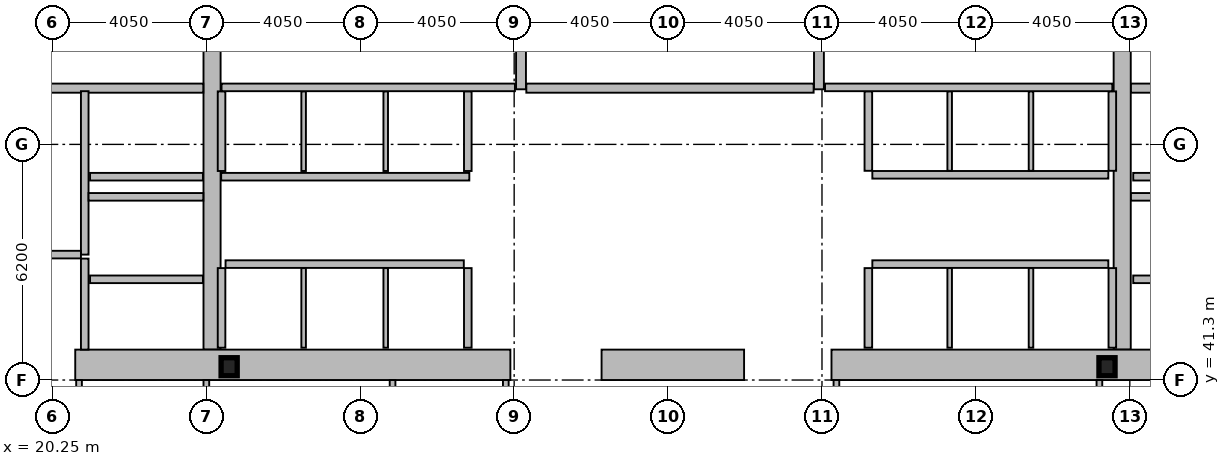
"""IFC4 building model, lengths in metres.
Left out: names, types, materials, properties, quantities, classifications, styles, units other than length and angle.
Written with IfcOpenShell. Run it as: python <this file> out.ifc"""

import sys

from ifc_helpers import new_model, si_unit, direction, frame, frame_2d, origin, origin_2d, place, context, subcontext, project, spatial, rectangle, i_section, extrude, element, fill, save


model = new_model("IFC4")
c1 = context("Model", 3, precision=1e-05, world=origin(), true_north=direction((0.0, 1.0)))
c2 = subcontext(c1, "Body", "Model", "MODEL_VIEW")
j1 = project(units=[si_unit("LENGTHUNIT", "METRE"), si_unit("PLANEANGLEUNIT", "RADIAN")], contexts=[c1])
p1 = place(None, origin())
s1 = spatial("IfcSite", under=j1, at=p1, CompositionType="ELEMENT")
p2 = place(p1, origin())
s2 = spatial("IfcBuilding", under=s1, at=p2, CompositionType="ELEMENT")
p3 = place(p2, frame((0.0, 0.0, 61.8)))
s3 = spatial("IfcBuildingStorey", under=s2, at=p3, CompositionType="ELEMENT", Elevation=61.8)
for number, where, z_axis, x_axis in (
    (1, (24.45, 42.1, 0.0), (0.0, 0.0, 1.0), (0.0, 1.0, 0.0)),
    (2, (48.4, 42.1, 0.0), (0.0, 0.0, 1.0), (0.0, 1.0, 0.0)),
):
    element("IfcWall", number, at=place(p3, frame(where, z_axis=z_axis, x_axis=x_axis)), inside=s3, PredefinedType="SHEAR", context=c2, shape_type="SweptSolid", body=[
        extrude(rectangle(XDim=10.8, YDim=0.45, at=frame_2d((5.4, 0.0))), origin(), (0.0, 0.0, 1.0), 3.82),
    ])
p4 = place(p3, frame((32.3, 41.7, 0.0), z_axis=(0.0, 0.0, 1.0), x_axis=(-1.0, 0.0, 0.0)))
e3 = element("IfcWall", 3, at=p4, inside=s3, PredefinedType="SHEAR", context=c2, shape_type="SweptSolid", body=[
    extrude(rectangle(XDim=11.45, YDim=0.8, at=frame_2d((5.725, 0.0))), origin(), (0.0, 0.0, 1.0), 3.82),
])
p5 = place(p3, frame((38.45, 41.7, 0.0), z_axis=(0.0, 0.0, 1.0), x_axis=(-1.0, 0.0, 0.0)))
e4 = element("IfcWall", 4, at=p5, inside=s3, PredefinedType="SHEAR", context=c2, shape_type="SweptSolid", body=[
    extrude(rectangle(XDim=3.75, YDim=0.8, at=frame_2d((1.875, 0.0))), origin(), (0.0, 0.0, 1.0), 3.82),
])
p6 = place(p3, frame((52.05, 41.7, 0.0), z_axis=(0.0, 0.0, 1.0), x_axis=(-1.0, 0.0, 0.0)))
e5 = element("IfcWall", 5, at=p6, inside=s3, PredefinedType="SHEAR", context=c2, shape_type="SweptSolid", body=[
    extrude(rectangle(XDim=11.3, YDim=0.8, at=frame_2d((5.65, 0.0))), origin(), (0.0, 0.0, 1.0), 3.82),
])
for number, where, z_axis, x_axis in (
    (6, (32.58, 48.95, 0.0), (0.0, 0.0, 1.0), (0.0, 1.0, 0.0)),
    (7, (40.42, 48.95, 0.0), (0.0, 0.0, 1.0), (0.0, 1.0, 0.0)),
):
    element("IfcWall", number, at=place(p3, frame(where, z_axis=z_axis, x_axis=x_axis)), inside=s3, PredefinedType="SHEAR", context=c2, shape_type="SweptSolid", body=[
        extrude(rectangle(XDim=3.95, YDim=0.26, at=frame_2d((1.975, 0.0))), origin(), (0.0, 0.0, 1.0), 3.82),
    ])
p7 = place(p3, frame((17.0, 48.98, 0.0), z_axis=(0.0, 0.0, 1.0), x_axis=(1.0, 0.0, 0.0)))
e8 = element("IfcWall", 8, at=p7, inside=s3, PredefinedType="SHEAR", context=c2, shape_type="SweptSolid", body=[
    extrude(rectangle(XDim=7.22, YDim=0.24, at=frame_2d((3.61, 0.0))), origin(), (0.0, 0.0, 1.0), 3.82),
])
p8 = place(p7, frame((0.22, 0.0, 0.0)))
e9 = element("IfcOpeningElement", 9, at=p8, cuts=e8, PredefinedType="OPENING", context=c2, shape_type="SweptSolid", body=[
    extrude(rectangle(XDim=1.05, YDim=2.15, at=frame_2d((0.525, 1.075))), frame((0.0, 0.13, 0.0), z_axis=(0.0, -1.0, 0.0), x_axis=(1.0, 0.0, 0.0)), (0.0, 0.0, 1.0), 0.26),
])
p9 = place(p3, frame((48.63, 48.98, 0.0), z_axis=(0.0, 0.0, 1.0), x_axis=(1.0, 0.0, 0.0)))
e10 = element("IfcWall", 10, at=p9, inside=s3, PredefinedType="SHEAR", context=c2, shape_type="SweptSolid", body=[
    extrude(rectangle(XDim=7.27, YDim=0.24, at=frame_2d((3.635, 0.0))), origin(), (0.0, 0.0, 1.0), 3.82),
])
p10 = place(p9, frame((6.0, 0.0, 0.0)))
e11 = element("IfcOpeningElement", 11, at=p10, cuts=e10, PredefinedType="OPENING", context=c2, shape_type="SweptSolid", body=[
    extrude(rectangle(XDim=1.05, YDim=2.15, at=frame_2d((0.525, 1.075))), frame((0.0, 0.13, 0.0), z_axis=(0.0, -1.0, 0.0), x_axis=(1.0, 0.0, 0.0)), (0.0, 0.0, 1.0), 0.26),
])
p11 = place(p3, frame((32.72, 48.98, 0.0), z_axis=(0.0, 0.0, 1.0), x_axis=(1.0, 0.0, 0.0)))
e12 = element("IfcWall", 12, at=p11, inside=s3, PredefinedType="SHEAR", context=c2, shape_type="SweptSolid", body=[
    extrude(rectangle(XDim=7.56, YDim=0.24, at=frame_2d((3.78, 0.0))), origin(), (0.0, 0.0, 1.0), 3.82),
])
p12 = place(p11, frame((0.22, 0.0, 0.0)))
e13 = element("IfcOpeningElement", 13, at=p12, cuts=e12, PredefinedType="OPENING", context=c2, shape_type="SweptSolid", body=[
    extrude(rectangle(XDim=1.05, YDim=2.15, at=frame_2d((0.525, 1.075))), frame((0.0, 0.13, 0.0), z_axis=(0.0, -1.0, 0.0), x_axis=(1.0, 0.0, 0.0)), (0.0, 0.0, 1.0), 0.26),
])
for number, where, z_axis, x_axis in (
    (14, (24.9, 41.65, 0.0), (0.0, 0.0, 1.0), (1.0, 0.0, 0.0)),
    (15, (48.0, 41.65, 0.0), (0.0, 0.0, 1.0), (1.0, 0.0, 0.0)),
):
    element("IfcColumn", number, at=place(p3, frame(where, z_axis=z_axis, x_axis=x_axis)), inside=s3, PredefinedType="COLUMN", context=c2, shape_type="SweptSolid", body=[
        extrude(i_section(OverallWidth=0.424, OverallDepth=0.474, WebThickness=0.048, FlangeThickness=0.077, at=origin_2d()), origin(), (0.0, 0.0, 1.0), 4.0),
    ])
p13 = place(p3, frame((51.61, 43.95, 0.0), z_axis=(0.0, 0.0, 1.0), x_axis=(-1.0, 0.0, 0.0)))
e16 = element("IfcWall", 16, at=p13, inside=s3, PredefinedType="PARTITIONING", context=c2, shape_type="SweptSolid", body=[
    extrude(rectangle(XDim=2.92, YDim=0.2, at=frame_2d((1.46, 0.0))), origin(), (0.0, 0.0, 1.0), 3.82),
])
p14 = place(p13, frame((0.81, 0.0, 0.0)))
e17 = element("IfcOpeningElement", 17, at=p14, cuts=e16, PredefinedType="OPENING", context=c2, shape_type="SweptSolid", body=[
    extrude(rectangle(XDim=1.3, YDim=2.18, at=frame_2d((0.65, 1.09))), frame((0.0, 0.11, 0.0), z_axis=(0.0, -1.0, 0.0), x_axis=(1.0, 0.0, 0.0)), (0.0, 0.0, 1.0), 0.22),
])
p15 = place(p3, frame((24.21, 43.95, 0.0), z_axis=(0.0, 0.0, 1.0), x_axis=(-1.0, 0.0, 0.0)))
e18 = element("IfcWall", 18, at=p15, inside=s3, PredefinedType="PARTITIONING", context=c2, shape_type="SweptSolid", body=[
    extrude(rectangle(XDim=2.97, YDim=0.2, at=frame_2d((1.485, 0.0))), origin(), (0.0, 0.0, 1.0), 3.82),
])
p16 = place(p15, frame((0.86, 0.0, 0.0)))
e19 = element("IfcOpeningElement", 19, at=p16, cuts=e18, PredefinedType="OPENING", context=c2, shape_type="SweptSolid", body=[
    extrude(rectangle(XDim=1.3, YDim=2.18, at=frame_2d((0.65, 1.09))), frame((0.0, 0.11, 0.0), z_axis=(0.0, -1.0, 0.0), x_axis=(1.0, 0.0, 0.0)), (0.0, 0.0, 1.0), 0.22),
])
p17 = place(p3, frame((51.61, 46.65, 0.0), z_axis=(0.0, 0.0, 1.0), x_axis=(-1.0, 0.0, 0.0)))
e20 = element("IfcWall", 20, at=p17, inside=s3, PredefinedType="PARTITIONING", context=c2, shape_type="SweptSolid", body=[
    extrude(rectangle(XDim=2.92, YDim=0.2, at=frame_2d((1.46, 0.0))), origin(), (0.0, 0.0, 1.0), 3.82),
])
p18 = place(p17, frame((0.86, 0.0, 0.0)))
e21 = element("IfcOpeningElement", 21, at=p18, cuts=e20, PredefinedType="OPENING", context=c2, shape_type="SweptSolid", body=[
    extrude(rectangle(XDim=1.2, YDim=2.18, at=frame_2d((0.6, 1.09))), frame((0.0, 0.11, 0.0), z_axis=(0.0, -1.0, 0.0), x_axis=(1.0, 0.0, 0.0)), (0.0, 0.0, 1.0), 0.22),
])
p19 = place(p3, frame((24.21, 46.65, 0.0), z_axis=(0.0, 0.0, 1.0), x_axis=(-1.0, 0.0, 0.0)))
e22 = element("IfcWall", 22, at=p19, inside=s3, PredefinedType="PARTITIONING", context=c2, shape_type="SweptSolid", body=[
    extrude(rectangle(XDim=2.97, YDim=0.2, at=frame_2d((1.485, 0.0))), origin(), (0.0, 0.0, 1.0), 3.82),
])
p20 = place(p19, frame((0.91, 0.0, 0.0)))
e23 = element("IfcOpeningElement", 23, at=p20, cuts=e22, PredefinedType="OPENING", context=c2, shape_type="SweptSolid", body=[
    extrude(rectangle(XDim=1.2, YDim=2.18, at=frame_2d((0.6, 1.09))), frame((0.0, 0.11, 0.0), z_axis=(0.0, -1.0, 0.0), x_axis=(1.0, 0.0, 0.0)), (0.0, 0.0, 1.0), 0.22),
])
p21 = place(p3, frame((31.22, 46.65, 0.0), z_axis=(0.0, 0.0, 1.0), x_axis=(-1.0, 0.0, 0.0)))
e24 = element("IfcWall", 24, at=p21, inside=s3, PredefinedType="PARTITIONING", context=c2, shape_type="SweptSolid", body=[
    extrude(rectangle(XDim=6.53, YDim=0.2, at=frame_2d((3.265, 0.0))), origin(), (0.0, 0.0, 1.0), 3.82),
])
p22 = place(p21, frame((4.9, 0.0, 0.0)))
e25 = element("IfcOpeningElement", 25, at=p22, cuts=e24, PredefinedType="OPENING", context=c2, shape_type="SweptSolid", body=[
    extrude(rectangle(XDim=1.1, YDim=2.18, at=frame_2d((0.55, 1.09))), frame((0.0, 0.11, 0.0), z_axis=(0.0, -1.0, 0.0), x_axis=(1.0, 0.0, 0.0)), (0.0, 0.0, 1.0), 0.22),
])
p23 = place(p21, frame((2.74, 0.0, 0.0)))
e26 = element("IfcOpeningElement", 26, at=p23, cuts=e24, PredefinedType="OPENING", context=c2, shape_type="SweptSolid", body=[
    extrude(rectangle(XDim=1.1, YDim=2.18, at=frame_2d((0.55, 1.09))), frame((0.0, 0.11, 0.0), z_axis=(0.0, -1.0, 0.0), x_axis=(1.0, 0.0, 0.0)), (0.0, 0.0, 1.0), 0.22),
])
p24 = place(p21, frame((0.58, 0.0, 0.0)))
e27 = element("IfcOpeningElement", 27, at=p24, cuts=e24, PredefinedType="OPENING", context=c2, shape_type="SweptSolid", body=[
    extrude(rectangle(XDim=1.1, YDim=2.18, at=frame_2d((0.55, 1.09))), frame((0.0, 0.11, 0.0), z_axis=(0.0, -1.0, 0.0), x_axis=(1.0, 0.0, 0.0)), (0.0, 0.0, 1.0), 0.22),
])
p25 = place(p3, frame((21.1, 44.6, 0.0), z_axis=(0.0, 0.0, 1.0), x_axis=(0.0, 1.0, 0.0)))
e28 = element("IfcWall", 28, at=p25, inside=s3, PredefinedType="PARTITIONING", context=c2, shape_type="SweptSolid", body=[
    extrude(rectangle(XDim=4.3, YDim=0.2, at=frame_2d((2.15, 0.0))), origin(), (0.0, 0.0, 1.0), 3.82),
])
p26 = place(p3, frame((17.0, 44.6, 0.0), z_axis=(0.0, 0.0, 1.0), x_axis=(1.0, 0.0, 0.0)))
e29 = element("IfcWall", 29, at=p26, inside=s3, PredefinedType="PARTITIONING", context=c2, shape_type="SweptSolid", body=[
    extrude(rectangle(XDim=4.0, YDim=0.2, at=frame_2d((2.0, 0.0))), origin(), (0.0, 0.0, 1.0), 3.82),
])
p27 = place(p26, frame((1.25, 0.0, 0.0)))
e30 = element("IfcOpeningElement", 30, at=p27, cuts=e29, PredefinedType="OPENING", context=c2, shape_type="SweptSolid", body=[
    extrude(rectangle(XDim=1.05, YDim=2.15, at=frame_2d((0.525, 1.075))), frame((0.0, 0.11, 0.0), z_axis=(0.0, -1.0, 0.0), x_axis=(1.0, 0.0, 0.0)), (0.0, 0.0, 1.0), 0.22),
])
p28 = place(p3, frame((21.2, 46.12, 0.0), z_axis=(0.0, 0.0, 1.0), x_axis=(1.0, 0.0, 0.0)))
e31 = element("IfcWall", 31, at=p28, inside=s3, PredefinedType="PARTITIONING", context=c2, shape_type="SweptSolid", body=[
    extrude(rectangle(XDim=3.02, YDim=0.2, at=frame_2d((1.51, 0.0))), origin(), (0.0, 0.0, 1.0), 3.82),
])
p29 = place(p3, frame((21.1, 42.1, 0.0), z_axis=(0.0, 0.0, 1.0), x_axis=(0.0, 1.0, 0.0)))
e32 = element("IfcWall", 32, at=p29, inside=s3, PredefinedType="PARTITIONING", context=c2, shape_type="SweptSolid", body=[
    extrude(rectangle(XDim=2.395, YDim=0.2, at=frame_2d((1.198, 0.0))), origin(), (0.0, 0.0, 1.0), 3.82),
])
p30 = place(p29, frame((0.38, 0.0, 0.0)))
e33 = element("IfcOpeningElement", 33, at=p30, cuts=e32, PredefinedType="OPENING", context=c2, shape_type="SweptSolid", body=[
    extrude(rectangle(XDim=1.05, YDim=2.15, at=frame_2d((0.525, 1.075))), frame((0.0, 0.11, 0.0), z_axis=(0.0, -1.0, 0.0), x_axis=(1.0, 0.0, 0.0)), (0.0, 0.0, 1.0), 0.22),
])
p31 = place(p3, frame((48.63, 46.12, 0.0), z_axis=(0.0, 0.0, 1.0), x_axis=(1.0, 0.0, 0.0)))
e34 = element("IfcWall", 34, at=p31, inside=s3, PredefinedType="PARTITIONING", context=c2, shape_type="SweptSolid", body=[
    extrude(rectangle(XDim=3.07, YDim=0.2, at=frame_2d((1.535, 0.0))), origin(), (0.0, 0.0, 1.0), 3.82),
])
for number, where, z_axis, x_axis in (
    (35, (24.7, 46.8, 0.0), (0.0, 0.0, 1.0), (0.0, 1.0, 0.0)),
    (36, (31.18, 46.8, 0.0), (0.0, 0.0, 1.0), (0.0, 1.0, 0.0)),
):
    element("IfcWall", number, at=place(p3, frame(where, z_axis=z_axis, x_axis=x_axis)), inside=s3, PredefinedType="PARTITIONING", context=c2, shape_type="SweptSolid", body=[
        extrude(rectangle(XDim=2.095, YDim=0.2, at=frame_2d((1.047, 0.0))), origin(), (0.0, 0.0, 1.0), 3.82),
    ])
for number, where, z_axis, x_axis in (
    (37, (26.86, 46.8, 0.0), (0.0, 0.0, 1.0), (0.0, 1.0, 0.0)),
    (38, (29.02, 46.8, 0.0), (0.0, 0.0, 1.0), (0.0, 1.0, 0.0)),
):
    element("IfcWall", number, at=place(p3, frame(where, z_axis=z_axis, x_axis=x_axis)), inside=s3, PredefinedType="PARTITIONING", context=c2, shape_type="SweptSolid", body=[
        extrude(rectangle(XDim=2.095, YDim=0.12, at=frame_2d((1.047, 0.0))), origin(), (0.0, 0.0, 1.0), 3.82),
    ])
p32 = place(p3, frame((24.805, 44.35, 0.0), z_axis=(0.0, 0.0, 1.0), x_axis=(1.0, 0.0, 0.0)))
e39 = element("IfcWall", 39, at=p32, inside=s3, PredefinedType="PARTITIONING", context=c2, shape_type="SweptSolid", body=[
    extrude(rectangle(XDim=6.27, YDim=0.2, at=frame_2d((3.135, 0.0))), origin(), (0.0, 0.0, 1.0), 3.82),
])
for number, where, z_axis, x_axis in (
    (40, (24.7, 42.15, 0.0), (0.0, 0.0, 1.0), (0.0, 1.0, 0.0)),
    (41, (31.18, 42.15, 0.0), (0.0, 0.0, 1.0), (0.0, 1.0, 0.0)),
):
    element("IfcWall", number, at=place(p3, frame(where, z_axis=z_axis, x_axis=x_axis)), inside=s3, PredefinedType="PARTITIONING", context=c2, shape_type="SweptSolid", body=[
        extrude(rectangle(XDim=2.095, YDim=0.2, at=frame_2d((1.048, 0.0))), origin(), (0.0, 0.0, 1.0), 3.82),
    ])
for number, where, z_axis, x_axis in (
    (42, (26.86, 42.15, 0.0), (0.0, 0.0, 1.0), (0.0, 1.0, 0.0)),
    (43, (29.02, 42.15, 0.0), (0.0, 0.0, 1.0), (0.0, 1.0, 0.0)),
):
    element("IfcWall", number, at=place(p3, frame(where, z_axis=z_axis, x_axis=x_axis)), inside=s3, PredefinedType="PARTITIONING", context=c2, shape_type="SweptSolid", body=[
        extrude(rectangle(XDim=2.095, YDim=0.12, at=frame_2d((1.048, 0.0))), origin(), (0.0, 0.0, 1.0), 3.82),
    ])
p33 = place(p3, frame((41.825, 46.7, 0.0), z_axis=(0.0, 0.0, 1.0), x_axis=(1.0, 0.0, 0.0)))
e44 = element("IfcWall", 44, at=p33, inside=s3, PredefinedType="PARTITIONING", context=c2, shape_type="SweptSolid", body=[
    extrude(rectangle(XDim=6.21, YDim=0.2, at=frame_2d((3.105, 0.0))), origin(), (0.0, 0.0, 1.0), 3.82),
])
for number, where, z_axis, x_axis in (
    (45, (41.72, 46.805, 0.0), (0.0, 0.0, 1.0), (0.0, 1.0, 0.0)),
    (46, (48.14, 46.805, 0.0), (0.0, 0.0, 1.0), (0.0, 1.0, 0.0)),
):
    element("IfcWall", number, at=place(p3, frame(where, z_axis=z_axis, x_axis=x_axis)), inside=s3, PredefinedType="PARTITIONING", context=c2, shape_type="SweptSolid", body=[
        extrude(rectangle(XDim=2.09, YDim=0.2, at=frame_2d((1.045, 0.0))), origin(), (0.0, 0.0, 1.0), 3.82),
    ])
for number, where, z_axis, x_axis in (
    (47, (43.86, 46.805, 0.0), (0.0, 0.0, 1.0), (0.0, 1.0, 0.0)),
    (48, (46.0, 46.805, 0.0), (0.0, 0.0, 1.0), (0.0, 1.0, 0.0)),
):
    element("IfcWall", number, at=place(p3, frame(where, z_axis=z_axis, x_axis=x_axis)), inside=s3, PredefinedType="PARTITIONING", context=c2, shape_type="SweptSolid", body=[
        extrude(rectangle(XDim=2.09, YDim=0.12, at=frame_2d((1.045, 0.0))), origin(), (0.0, 0.0, 1.0), 3.82),
    ])
p34 = place(p3, frame((41.825, 44.35, 0.0), z_axis=(0.0, 0.0, 1.0), x_axis=(1.0, 0.0, 0.0)))
e49 = element("IfcWall", 49, at=p34, inside=s3, PredefinedType="PARTITIONING", context=c2, shape_type="SweptSolid", body=[
    extrude(rectangle(XDim=6.21, YDim=0.2, at=frame_2d((3.105, 0.0))), origin(), (0.0, 0.0, 1.0), 3.82),
])
for number, where, z_axis, x_axis in (
    (50, (41.72, 42.15, 0.0), (0.0, 0.0, 1.0), (0.0, 1.0, 0.0)),
    (51, (48.14, 42.15, 0.0), (0.0, 0.0, 1.0), (0.0, 1.0, 0.0)),
):
    element("IfcWall", number, at=place(p3, frame(where, z_axis=z_axis, x_axis=x_axis)), inside=s3, PredefinedType="PARTITIONING", context=c2, shape_type="SweptSolid", body=[
        extrude(rectangle(XDim=2.095, YDim=0.2, at=frame_2d((1.048, 0.0))), origin(), (0.0, 0.0, 1.0), 3.82),
    ])
for number, where, z_axis, x_axis in (
    (52, (43.86, 42.15, 0.0), (0.0, 0.0, 1.0), (0.0, 1.0, 0.0)),
    (53, (46.0, 42.15, 0.0), (0.0, 0.0, 1.0), (0.0, 1.0, 0.0)),
):
    element("IfcWall", number, at=place(p3, frame(where, z_axis=z_axis, x_axis=x_axis)), inside=s3, PredefinedType="PARTITIONING", context=c2, shape_type="SweptSolid", body=[
        extrude(rectangle(XDim=2.095, YDim=0.12, at=frame_2d((1.048, 0.0))), origin(), (0.0, 0.0, 1.0), 3.82),
    ])
p35 = place(p3, frame((24.7, 49.0, 0.0), z_axis=(0.0, 0.0, 1.0), x_axis=(1.0, 0.0, 0.0)))
e54 = element("IfcWall", 54, at=p35, inside=s3, PredefinedType="PARTITIONING", context=c2, shape_type="SweptSolid", body=[
    extrude(rectangle(XDim=7.72, YDim=0.2, at=frame_2d((3.86, 0.0))), origin(), (0.0, 0.0, 1.0), 3.82),
])
p36 = place(p35, frame((6.56, 0.0, 0.0)))
e55 = element("IfcOpeningElement", 55, at=p36, cuts=e54, PredefinedType="OPENING", context=c2, shape_type="SweptSolid", body=[
    extrude(rectangle(XDim=0.95, YDim=2.1, at=frame_2d((0.475, 1.05))), frame((0.0, 0.11, 0.0), z_axis=(0.0, -1.0, 0.0), x_axis=(1.0, 0.0, 0.0)), (0.0, 0.0, 1.0), 0.22),
])
p37 = place(p3, frame((40.58, 49.0, 0.0), z_axis=(0.0, 0.0, 1.0), x_axis=(1.0, 0.0, 0.0)))
e56 = element("IfcWall", 56, at=p37, inside=s3, PredefinedType="PARTITIONING", context=c2, shape_type="SweptSolid", body=[
    extrude(rectangle(XDim=7.56, YDim=0.2, at=frame_2d((3.78, 0.0))), origin(), (0.0, 0.0, 1.0), 3.82),
])
p38 = place(p37, frame((0.16, 0.0, 0.0)))
e57 = element("IfcOpeningElement", 57, at=p38, cuts=e56, PredefinedType="OPENING", context=c2, shape_type="SweptSolid", body=[
    extrude(rectangle(XDim=0.95, YDim=2.1, at=frame_2d((0.475, 1.05))), frame((0.0, 0.11, 0.0), z_axis=(0.0, -1.0, 0.0), x_axis=(1.0, 0.0, 0.0)), (0.0, 0.0, 1.0), 0.22),
])
for number, where, z_axis, x_axis in (
    (58, (20.95, 38.28, 0.0), (0.0, 0.0, 1.0), (0.0, 1.0, 0.0)),
    (59, (24.3, 38.28, 0.0), (0.0, 0.0, 1.0), (0.0, 1.0, 0.0)),
    (60, (29.2, 38.28, 0.0), (0.0, 0.0, 1.0), (0.0, 1.0, 0.0)),
    (61, (32.18, 38.28, 0.0), (0.0, 0.0, 1.0), (0.0, 1.0, 0.0)),
    (62, (40.88, 38.28, 0.0), (0.0, 0.0, 1.0), (0.0, 1.0, 0.0)),
):
    element("IfcWall", number, at=place(p3, frame(where, z_axis=z_axis, x_axis=x_axis)), inside=s3, PredefinedType="PARTITIONING", context=c2, shape_type="SweptSolid", body=[
        extrude(rectangle(XDim=3.02, YDim=0.15, at=frame_2d((1.51, 0.0))), origin(), (0.0, 0.0, 1.0), 3.82),
    ])
p39 = place(p3, frame((47.8, 38.28, 0.0), z_axis=(0.0, 0.0, 1.0), x_axis=(0.0, 1.0, 0.0)))
e63 = element("IfcWall", 63, at=p39, inside=s3, PredefinedType="PARTITIONING", context=c2, shape_type="SweptSolid", body=[
    extrude(rectangle(XDim=3.02, YDim=0.15, at=frame_2d((1.51, 0.0))), origin(), (0.0, 0.0, 1.0), 3.01),
])
p40 = place(p12, origin())
e64 = element("IfcDoor", 64, at=p40, inside=s3, OperationType="SINGLE_SWING_LEFT", PredefinedType="DOOR", context=c2, shape_type="SweptSolid", body=[
    extrude(rectangle(XDim=1.05, YDim=2.15, at=frame_2d((0.525, 1.075))), frame((0.0, 0.025, 0.0), z_axis=(0.0, -1.0, 0.0), x_axis=(1.0, 0.0, 0.0)), (0.0, 0.0, 1.0), 0.05),
])
fill(e13, e64)
p41 = place(p16, origin())
e65 = element("IfcDoor", 65, at=p41, inside=s3, OperationType="SLIDING_TO_LEFT", PredefinedType="DOOR", context=c2, shape_type="SweptSolid", body=[
    extrude(rectangle(XDim=1.3, YDim=2.18, at=frame_2d((0.65, 1.09))), frame((0.0, 0.025, 0.0), z_axis=(0.0, -1.0, 0.0), x_axis=(1.0, 0.0, 0.0)), (0.0, 0.0, 1.0), 0.05),
])
fill(e19, e65)
p42 = place(p20, origin())
e66 = element("IfcDoor", 66, at=p42, inside=s3, OperationType="SLIDING_TO_LEFT", PredefinedType="DOOR", context=c2, shape_type="SweptSolid", body=[
    extrude(rectangle(XDim=1.2, YDim=2.18, at=frame_2d((0.6, 1.09))), frame((0.0, 0.025, 0.0), z_axis=(0.0, -1.0, 0.0), x_axis=(1.0, 0.0, 0.0)), (0.0, 0.0, 1.0), 0.05),
])
fill(e23, e66)
p43 = place(p22, origin())
e67 = element("IfcDoor", 67, at=p43, inside=s3, OperationType="SLIDING_TO_LEFT", PredefinedType="DOOR", context=c2, shape_type="SweptSolid", body=[
    extrude(rectangle(XDim=1.1, YDim=2.18, at=frame_2d((0.55, 1.09))), frame((0.0, 0.025, 0.0), z_axis=(0.0, -1.0, 0.0), x_axis=(1.0, 0.0, 0.0)), (0.0, 0.0, 1.0), 0.05),
])
fill(e25, e67)
p44 = place(p23, origin())
e68 = element("IfcDoor", 68, at=p44, inside=s3, OperationType="SLIDING_TO_LEFT", PredefinedType="DOOR", context=c2, shape_type="SweptSolid", body=[
    extrude(rectangle(XDim=1.1, YDim=2.18, at=frame_2d((0.55, 1.09))), frame((0.0, 0.025, 0.0), z_axis=(0.0, -1.0, 0.0), x_axis=(1.0, 0.0, 0.0)), (0.0, 0.0, 1.0), 0.05),
])
fill(e26, e68)
p45 = place(p24, origin())
e69 = element("IfcDoor", 69, at=p45, inside=s3, OperationType="SLIDING_TO_LEFT", PredefinedType="DOOR", context=c2, shape_type="SweptSolid", body=[
    extrude(rectangle(XDim=1.1, YDim=2.18, at=frame_2d((0.55, 1.09))), frame((0.0, 0.025, 0.0), z_axis=(0.0, -1.0, 0.0), x_axis=(1.0, 0.0, 0.0)), (0.0, 0.0, 1.0), 0.05),
])
fill(e27, e69)
p46 = place(p30, origin())
e70 = element("IfcDoor", 70, at=p46, inside=s3, OperationType="SINGLE_SWING_LEFT", PredefinedType="DOOR", context=c2, shape_type="SweptSolid", body=[
    extrude(rectangle(XDim=1.05, YDim=2.15, at=frame_2d((0.525, 1.075))), frame((0.0, 0.025, 0.0), z_axis=(0.0, -1.0, 0.0), x_axis=(1.0, 0.0, 0.0)), (0.0, 0.0, 1.0), 0.05),
])
fill(e33, e70)
p47 = place(p36, origin())
e71 = element("IfcDoor", 71, at=p47, inside=s3, OperationType="SINGLE_SWING_RIGHT", PredefinedType="DOOR", context=c2, shape_type="SweptSolid", body=[
    extrude(rectangle(XDim=0.95, YDim=2.1, at=frame_2d((0.475, 1.05))), frame((0.0, 0.025, 0.0), z_axis=(0.0, -1.0, 0.0), x_axis=(1.0, 0.0, 0.0)), (0.0, 0.0, 1.0), 0.05),
])
fill(e55, e71)
p48 = place(p38, origin())
e72 = element("IfcDoor", 72, at=p48, inside=s3, OperationType="SINGLE_SWING_LEFT", PredefinedType="DOOR", context=c2, shape_type="SweptSolid", body=[
    extrude(rectangle(XDim=0.95, YDim=2.1, at=frame_2d((0.475, 1.05))), frame((0.0, 0.025, 0.0), z_axis=(0.0, -1.0, 0.0), x_axis=(1.0, 0.0, 0.0)), (0.0, 0.0, 1.0), 0.05),
])
fill(e57, e72)
save(model, sys.argv[1])
